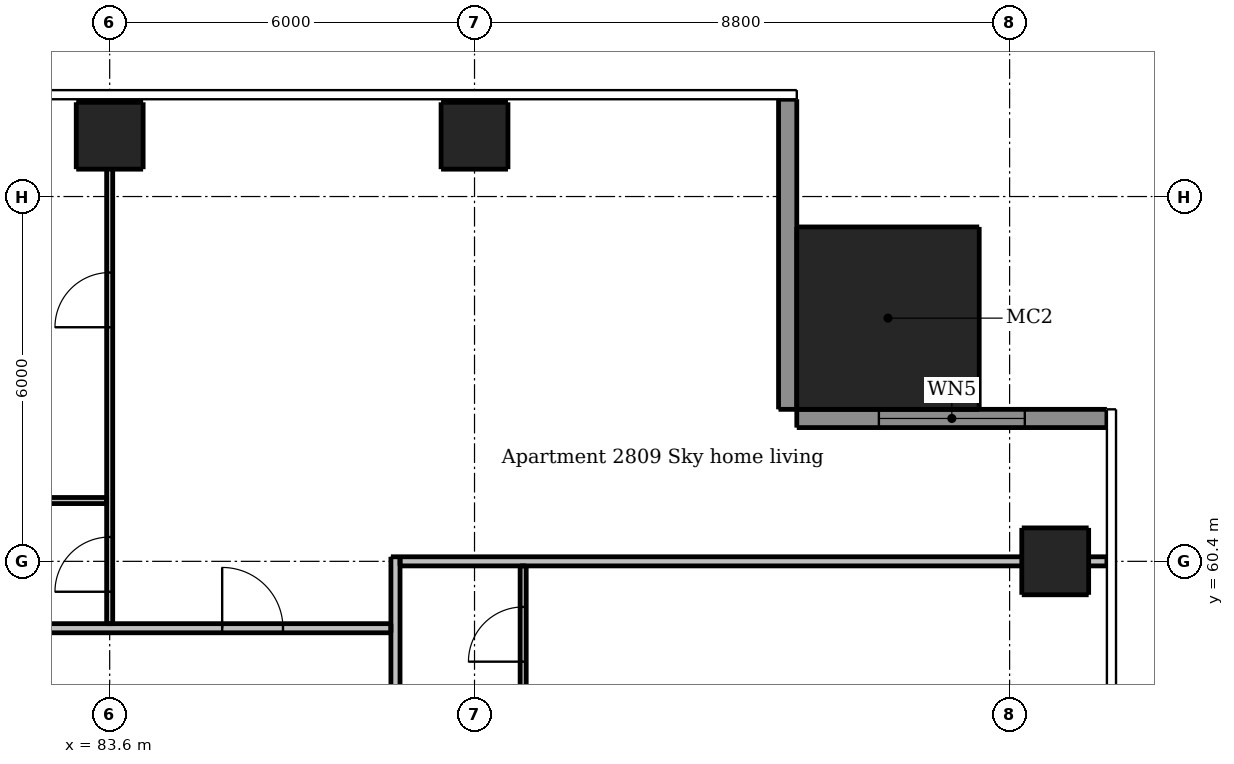
"""IFC4 building model, lengths in metres.
Left out: names, types, materials, properties, quantities, classifications, styles, units other than length and angle.
Written with IfcOpenShell. Run it as: python <this file> out.ifc"""

import sys

from ifc_helpers import new_model, si_unit, direction, frame, frame_2d, origin, origin_2d, place, context, subcontext, project, spatial, rectangle, extrude, element, fill, save


model = new_model("IFC4")
c1 = context("Model", 3, precision=1e-05, world=origin(), true_north=direction((0.0, 1.0)))
c2 = subcontext(c1, "Body", "Model", "MODEL_VIEW")
j1 = project(units=[si_unit("LENGTHUNIT", "METRE"), si_unit("PLANEANGLEUNIT", "RADIAN")], contexts=[c1])
p1 = place(None, origin())
s1 = spatial("IfcSite", under=j1, at=p1, CompositionType="ELEMENT")
p2 = place(p1, origin())
s2 = spatial("IfcBuilding", under=s1, at=p2, CompositionType="ELEMENT")
p3 = place(p2, frame((0.0, 0.0, 105.1)))
s3 = spatial("IfcBuildingStorey", under=s2, at=p3, CompositionType="ELEMENT", Elevation=105.1)
for number, where, z_axis, x_axis in (
    (1, (99.15, 60.4, 0.0), (0.0, 0.0, 1.0), (1.0, 0.0, 0.0)),
    (2, (83.6, 67.4, 0.0), (0.0, 0.0, 1.0), (1.0, 0.0, 0.0)),
    (3, (89.6, 67.4, 0.0), (0.0, 0.0, 1.0), (1.0, 0.0, 0.0)),
):
    element("IfcColumn", number, at=place(p3, frame(where, z_axis=z_axis, x_axis=x_axis)), inside=s3, PredefinedType="COLUMN", context=c2, shape_type="SweptSolid", body=[
        extrude(rectangle(XDim=1.1, YDim=1.1, at=origin_2d()), origin(), (0.0, 0.0, 1.0), 3.05),
    ])
p4 = place(p3, frame((96.4, 64.4, 0.0), z_axis=(0.0, 0.0, 1.0), x_axis=(1.0, 0.0, 0.0)))
e4 = element("IfcColumn", 4, at=p4, inside=s3, PredefinedType="COLUMN", context=c2, shape_type="SweptSolid", body=[
    extrude(rectangle(XDim=3.0, YDim=3.0, at=origin_2d()), origin(), (0.0, 0.0, 1.0), 3.3),
])
p5 = place(p3, frame((100.0, 62.75, 0.0), z_axis=(0.0, 0.0, 1.0), x_axis=(-1.0, 0.0, 0.0)))
e5 = element("IfcWall", 5, at=p5, inside=s3, PredefinedType="SOLIDWALL", context=c2, shape_type="SweptSolid", body=[
    extrude(rectangle(XDim=5.1, YDim=0.3, at=frame_2d((2.55, 0.0))), origin(), (0.0, 0.0, 1.0), 3.05),
])
p6 = place(p5, frame((1.35, 0.0, 0.15)))
e6 = element("IfcOpeningElement", 6, at=p6, cuts=e5, PredefinedType="OPENING", context=c2, shape_type="SweptSolid", body=[
    extrude(rectangle(XDim=2.4, YDim=2.1, at=frame_2d((1.2, 1.05))), frame((0.0, 0.16, 0.0), z_axis=(0.0, -1.0, 0.0), x_axis=(1.0, 0.0, 0.0)), (0.0, 0.0, 1.0), 0.32),
])
p7 = place(p3, frame((94.75, 62.9, 0.0), z_axis=(0.0, 0.0, 1.0), x_axis=(0.0, 1.0, 0.0)))
e7 = element("IfcWall", 7, at=p7, inside=s3, PredefinedType="SOLIDWALL", context=c2, shape_type="SweptSolid", body=[
    extrude(rectangle(XDim=5.1, YDim=0.3, at=frame_2d((2.55, 0.0))), origin(), (0.0, 0.0, 1.0), 3.05),
])
p8 = place(p3, frame((83.6, 59.375, 0.0), z_axis=(0.0, 0.0, 1.0), x_axis=(0.0, 1.0, 0.0)))
e8 = element("IfcWall", 8, at=p8, inside=s3, PredefinedType="PARTITIONING", context=c2, shape_type="SweptSolid", body=[
    extrude(rectangle(XDim=8.625, YDim=0.1, at=frame_2d((4.312, 0.0))), origin(), (0.0, 0.0, 1.0), 2.516),
])
p9 = place(p8, frame((0.525, 0.0, 0.0)))
e9 = element("IfcOpeningElement", 9, at=p9, cuts=e8, PredefinedType="OPENING", context=c2, shape_type="SweptSolid", body=[
    extrude(rectangle(XDim=0.9, YDim=2.1, at=frame_2d((0.45, 1.05))), frame((0.0, 0.06, 0.0), z_axis=(0.0, -1.0, 0.0), x_axis=(1.0, 0.0, 0.0)), (0.0, 0.0, 1.0), 0.12),
])
p10 = place(p8, frame((4.875, 0.0, 0.0)))
e10 = element("IfcOpeningElement", 10, at=p10, cuts=e8, PredefinedType="OPENING", context=c2, shape_type="SweptSolid", body=[
    extrude(rectangle(XDim=0.9, YDim=2.1, at=frame_2d((0.45, 1.05))), frame((0.0, 0.06, 0.0), z_axis=(0.0, -1.0, 0.0), x_axis=(1.0, 0.0, 0.0)), (0.0, 0.0, 1.0), 0.12),
])
p11 = place(p3, frame((90.4, 57.95, 0.0), z_axis=(0.0, 0.0, 1.0), x_axis=(0.0, 1.0, 0.0)))
e11 = element("IfcWall", 11, at=p11, inside=s3, PredefinedType="PARTITIONING", context=c2, shape_type="SweptSolid", body=[
    extrude(rectangle(XDim=2.375, YDim=0.1, at=frame_2d((1.188, 0.0))), origin(), (0.0, 0.0, 1.0), 3.05),
])
p12 = place(p11, frame((0.8, 0.0, 0.0)))
e12 = element("IfcOpeningElement", 12, at=p12, cuts=e11, PredefinedType="OPENING", context=c2, shape_type="SweptSolid", body=[
    extrude(rectangle(XDim=0.9, YDim=2.1, at=frame_2d((0.45, 1.05))), frame((0.0, 0.06, 0.0), z_axis=(0.0, -1.0, 0.0), x_axis=(1.0, 0.0, 0.0)), (0.0, 0.0, 1.0), 0.12),
])
p13 = place(p3, frame((83.55, 61.4, 0.0), z_axis=(0.0, 0.0, 1.0), x_axis=(-1.0, 0.0, 0.0)))
e13 = element("IfcWall", 13, at=p13, inside=s3, PredefinedType="PARTITIONING", context=c2, shape_type="SweptSolid", body=[
    extrude(rectangle(XDim=5.875, YDim=0.1, at=frame_2d((2.938, 0.0))), origin(), (0.0, 0.0, 1.0), 3.05),
])
p14 = place(p13, frame((3.75, 0.0, 0.0)))
e14 = element("IfcOpeningElement", 14, at=p14, cuts=e13, PredefinedType="OPENING", context=c2, shape_type="SweptSolid", body=[
    extrude(rectangle(XDim=0.8, YDim=2.1, at=frame_2d((0.4, 1.05))), frame((0.0, 0.06, 0.0), z_axis=(0.0, -1.0, 0.0), x_axis=(1.0, 0.0, 0.0)), (0.0, 0.0, 1.0), 0.12),
])
p15 = place(p3, frame((88.3, 60.475, 0.0), z_axis=(0.0, 0.0, 1.0), x_axis=(0.0, -1.0, 0.0)))
e15 = element("IfcWall", 15, at=p15, inside=s3, PredefinedType="PARTITIONING", context=c2, shape_type="SweptSolid", body=[
    extrude(rectangle(XDim=28.7, YDim=0.15, at=frame_2d((14.35, 0.0))), origin(), (0.0, 0.0, 1.0), 3.05),
])
p16 = place(p15, frame((27.425, 0.0, 0.0)))
e16 = element("IfcOpeningElement", 16, at=p16, cuts=e15, PredefinedType="OPENING", context=c2, shape_type="SweptSolid", body=[
    extrude(rectangle(XDim=1.0, YDim=2.1, at=frame_2d((0.5, 1.05))), frame((0.0, 0.085, 0.0), z_axis=(0.0, -1.0, 0.0), x_axis=(1.0, 0.0, 0.0)), (0.0, 0.0, 1.0), 0.17),
])
p17 = place(p15, frame((14.575, 0.0, 0.0)))
e17 = element("IfcOpeningElement", 17, at=p17, cuts=e15, PredefinedType="OPENING", context=c2, shape_type="SweptSolid", body=[
    extrude(rectangle(XDim=1.0, YDim=2.1, at=frame_2d((0.5, 1.05))), frame((0.0, 0.085, 0.0), z_axis=(0.0, -1.0, 0.0), x_axis=(1.0, 0.0, 0.0)), (0.0, 0.0, 1.0), 0.17),
])
p18 = place(p15, frame((3.775, 0.0, 0.0)))
e18 = element("IfcOpeningElement", 18, at=p18, cuts=e15, PredefinedType="OPENING", context=c2, shape_type="SweptSolid", body=[
    extrude(rectangle(XDim=1.0, YDim=2.1, at=frame_2d((0.5, 1.05))), frame((0.0, 0.085, 0.0), z_axis=(0.0, -1.0, 0.0), x_axis=(1.0, 0.0, 0.0)), (0.0, 0.0, 1.0), 0.17),
])
p19 = place(p3, frame((88.375, 60.4, 0.0), z_axis=(0.0, 0.0, 1.0), x_axis=(1.0, 0.0, 0.0)))
e19 = element("IfcWall", 19, at=p19, inside=s3, PredefinedType="PARTITIONING", context=c2, shape_type="SweptSolid", body=[
    extrude(rectangle(XDim=11.625, YDim=0.15, at=frame_2d((5.812, 0.0))), origin(), (0.0, 0.0, 1.0), 2.516),
])
p20 = place(p3, frame((59.675, 59.3, 0.0), z_axis=(0.0, 0.0, 1.0), x_axis=(1.0, 0.0, 0.0)))
e20 = element("IfcWall", 20, at=p20, inside=s3, PredefinedType="PARTITIONING", context=c2, shape_type="SweptSolid", body=[
    extrude(rectangle(XDim=28.55, YDim=0.15, at=frame_2d((14.275, 0.0))), origin(), (0.0, 0.0, 1.0), 3.05),
])
p21 = place(p20, frame((3.625, 0.0, 0.0)))
e21 = element("IfcOpeningElement", 21, at=p21, cuts=e20, PredefinedType="OPENING", context=c2, shape_type="SweptSolid", body=[
    extrude(rectangle(XDim=1.0, YDim=2.1, at=frame_2d((0.5, 1.05))), frame((0.0, 0.085, 0.0), z_axis=(0.0, -1.0, 0.0), x_axis=(1.0, 0.0, 0.0)), (0.0, 0.0, 1.0), 0.17),
])
p22 = place(p20, frame((14.425, 0.0, 0.0)))
e22 = element("IfcOpeningElement", 22, at=p22, cuts=e20, PredefinedType="OPENING", context=c2, shape_type="SweptSolid", body=[
    extrude(rectangle(XDim=1.0, YDim=2.1, at=frame_2d((0.5, 1.05))), frame((0.0, 0.085, 0.0), z_axis=(0.0, -1.0, 0.0), x_axis=(1.0, 0.0, 0.0)), (0.0, 0.0, 1.0), 0.17),
])
p23 = place(p20, frame((25.775, 0.0, 0.0)))
e23 = element("IfcOpeningElement", 23, at=p23, cuts=e20, PredefinedType="OPENING", context=c2, shape_type="SweptSolid", body=[
    extrude(rectangle(XDim=1.0, YDim=2.1, at=frame_2d((0.5, 1.05))), frame((0.0, 0.085, 0.0), z_axis=(0.0, -1.0, 0.0), x_axis=(1.0, 0.0, 0.0)), (0.0, 0.0, 1.0), 0.17),
])
p24 = place(p6, origin())
e24 = element("IfcWindow", 24, at=p24, inside=s3, PartitioningType="DOUBLE_PANEL_VERTICAL", PredefinedType="WINDOW", context=c2, shape_type="SweptSolid", body=[
    extrude(rectangle(XDim=2.4, YDim=2.1, at=frame_2d((1.2, 1.05))), frame((0.0, 0.03, 0.0), z_axis=(0.0, -1.0, 0.0), x_axis=(1.0, 0.0, 0.0)), (0.0, 0.0, 1.0), 0.06),
])
fill(e6, e24)
p25 = place(p12, origin())
e25 = element("IfcDoor", 25, at=p25, inside=s3, OperationType="SINGLE_SWING_LEFT", PredefinedType="DOOR", context=c2, shape_type="SweptSolid", body=[
    extrude(rectangle(XDim=0.9, YDim=2.1, at=frame_2d((0.45, 1.05))), frame((0.0, 0.025, 0.0), z_axis=(0.0, -1.0, 0.0), x_axis=(1.0, 0.0, 0.0)), (0.0, 0.0, 1.0), 0.05),
])
fill(e12, e25)
p26 = place(p23, origin())
e26 = element("IfcDoor", 26, at=p26, inside=s3, OperationType="SINGLE_SWING_LEFT", PredefinedType="DOOR", context=c2, shape_type="SweptSolid", body=[
    extrude(rectangle(XDim=1.0, YDim=2.1, at=frame_2d((0.5, 1.05))), frame((0.0, 0.025, 0.0), z_axis=(0.0, -1.0, 0.0), x_axis=(1.0, 0.0, 0.0)), (0.0, 0.0, 1.0), 0.05),
])
fill(e23, e26)
p27 = place(p9, origin())
e27 = element("IfcDoor", 27, at=p27, inside=s3, OperationType="SINGLE_SWING_LEFT", PredefinedType="DOOR", context=c2, shape_type="SweptSolid", body=[
    extrude(rectangle(XDim=0.9, YDim=2.1, at=frame_2d((0.45, 1.05))), frame((0.0, 0.025, 0.0), z_axis=(0.0, -1.0, 0.0), x_axis=(1.0, 0.0, 0.0)), (0.0, 0.0, 1.0), 0.05),
])
fill(e9, e27)
p28 = place(p10, origin())
e28 = element("IfcDoor", 28, at=p28, inside=s3, OperationType="SINGLE_SWING_LEFT", PredefinedType="DOOR", context=c2, shape_type="SweptSolid", body=[
    extrude(rectangle(XDim=0.9, YDim=2.1, at=frame_2d((0.45, 1.05))), frame((0.0, 0.025, 0.0), z_axis=(0.0, -1.0, 0.0), x_axis=(1.0, 0.0, 0.0)), (0.0, 0.0, 1.0), 0.05),
])
fill(e10, e28)
save(model, sys.argv[1])
